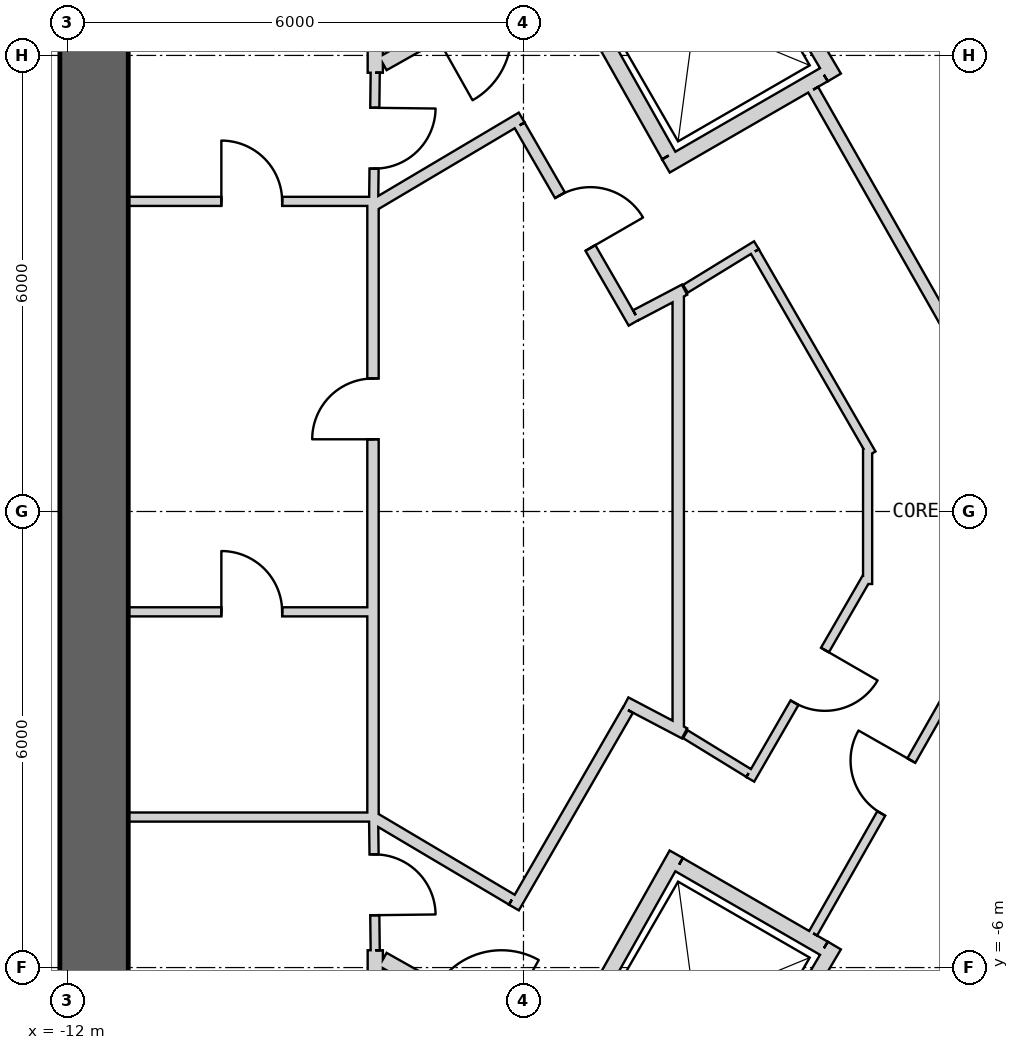
"""IFC4 building model, lengths in metres.
Left out: names, types, materials, properties, quantities, classifications, styles, units other than length and angle.
Written with IfcOpenShell. Run it as: python <this file> out.ifc"""

import sys

from ifc_helpers import new_model, si_unit, direction, frame, frame_2d, origin, place, context, subcontext, project, spatial, rectangle, extrude, element, fill, save


model = new_model("IFC4")
c1 = context("Model", 3, precision=1e-05, world=origin(), true_north=direction((0.0, 1.0)))
c2 = subcontext(c1, "Body", "Model", "MODEL_VIEW")
j1 = project(units=[si_unit("LENGTHUNIT", "METRE"), si_unit("PLANEANGLEUNIT", "RADIAN")], contexts=[c1])
p1 = place(None, origin())
s1 = spatial("IfcSite", under=j1, at=p1, CompositionType="ELEMENT")
p2 = place(p1, origin())
s2 = spatial("IfcBuilding", under=s1, at=p2, CompositionType="ELEMENT")
p3 = place(p2, frame((0.0, 0.0, 435.3)))
s3 = spatial("IfcBuildingStorey", under=s2, at=p3, CompositionType="ELEMENT", Elevation=435.3)
p4 = place(p3, frame((19.475, 2.208, 0.0), z_axis=(0.0, 0.0, 1.0), x_axis=(-0.866028369851, 0.499994862586, 0.0)))
e1 = element("IfcWall", 1, at=p4, inside=s3, PredefinedType="SHEAR", context=c2, shape_type="SweptSolid", body=[
    extrude(rectangle(XDim=31.523, YDim=0.9, at=frame_2d((15.762, 0.0))), origin(), (0.0, 0.0, 1.0), 5.0),
])
p5 = place(p4, frame((3.612, 0.0, 0.0)))
e2 = element("IfcOpeningElement", 2, at=p5, cuts=e1, PredefinedType="OPENING", context=c2, shape_type="SweptSolid", body=[
    extrude(rectangle(XDim=1.2, YDim=2.4, at=frame_2d((0.6, 1.2))), frame((0.0, 0.46, 0.0), z_axis=(0.0, -1.0, 0.0), x_axis=(1.0, 0.0, 0.0)), (0.0, 0.0, 1.0), 0.92),
])
p6 = place(p4, frame((26.712, 0.0, 0.0)))
e3 = element("IfcOpeningElement", 3, at=p6, cuts=e1, PredefinedType="OPENING", context=c2, shape_type="SweptSolid", body=[
    extrude(rectangle(XDim=1.2, YDim=2.4, at=frame_2d((0.6, 1.2))), frame((0.0, 0.46, 0.0), z_axis=(0.0, -1.0, 0.0), x_axis=(1.0, 0.0, 0.0)), (0.0, 0.0, 1.0), 0.92),
])
p7 = place(p3, frame((-11.65, 15.762, 0.0), z_axis=(0.0, 0.0, 1.0), x_axis=(0.0, -1.0, 0.0)))
e4 = element("IfcWall", 4, at=p7, inside=s3, PredefinedType="SHEAR", context=c2, shape_type="SweptSolid", body=[
    extrude(rectangle(XDim=31.523, YDim=0.9, at=frame_2d((15.762, 0.0))), origin(), (0.0, 0.0, 1.0), 5.0),
])
p8 = place(p7, frame((3.612, 0.0, 0.0)))
e5 = element("IfcOpeningElement", 5, at=p8, cuts=e4, PredefinedType="OPENING", context=c2, shape_type="SweptSolid", body=[
    extrude(rectangle(XDim=1.2, YDim=2.4, at=frame_2d((0.6, 1.2))), frame((0.0, 0.46, 0.0), z_axis=(0.0, -1.0, 0.0), x_axis=(1.0, 0.0, 0.0)), (0.0, 0.0, 1.0), 0.92),
])
p9 = place(p7, frame((26.712, 0.0, 0.0)))
e6 = element("IfcOpeningElement", 6, at=p9, cuts=e4, PredefinedType="OPENING", context=c2, shape_type="SweptSolid", body=[
    extrude(rectangle(XDim=1.2, YDim=2.4, at=frame_2d((0.6, 1.2))), frame((0.0, 0.46, 0.0), z_axis=(0.0, -1.0, 0.0), x_axis=(1.0, 0.0, 0.0)), (0.0, 0.0, 1.0), 0.92),
])
p10 = place(p3, frame((-7.825, -17.97, 0.0), z_axis=(0.0, 0.0, 1.0), x_axis=(0.866028369851, 0.499994862586, 0.0)))
e7 = element("IfcWall", 7, at=p10, inside=s3, PredefinedType="SHEAR", context=c2, shape_type="SweptSolid", body=[
    extrude(rectangle(XDim=31.523, YDim=0.9, at=frame_2d((15.762, 0.0))), origin(), (0.0, 0.0, 1.0), 5.0),
])
p11 = place(p10, frame((17.862, 0.0, 0.0)))
e8 = element("IfcOpeningElement", 8, at=p11, cuts=e7, PredefinedType="OPENING", context=c2, shape_type="SweptSolid", body=[
    extrude(rectangle(XDim=1.2, YDim=2.4, at=frame_2d((0.6, 1.2))), frame((0.0, 0.46, 0.0), z_axis=(0.0, -1.0, 0.0), x_axis=(1.0, 0.0, 0.0)), (0.0, 0.0, 1.0), 0.92),
])
p12 = place(p10, frame((20.562, 0.0, 0.0)))
e9 = element("IfcOpeningElement", 9, at=p12, cuts=e7, PredefinedType="OPENING", context=c2, shape_type="SweptSolid", body=[
    extrude(rectangle(XDim=1.2, YDim=2.4, at=frame_2d((0.6, 1.2))), frame((0.0, 0.46, 0.0), z_axis=(0.0, -1.0, 0.0), x_axis=(1.0, 0.0, 0.0)), (0.0, 0.0, 1.0), 0.92),
])
p13 = place(p10, frame((26.712, 0.0, 0.0)))
e10 = element("IfcOpeningElement", 10, at=p13, cuts=e7, PredefinedType="OPENING", context=c2, shape_type="SweptSolid", body=[
    extrude(rectangle(XDim=1.2, YDim=2.4, at=frame_2d((0.6, 1.2))), frame((0.0, 0.46, 0.0), z_axis=(0.0, -1.0, 0.0), x_axis=(1.0, 0.0, 0.0)), (0.0, 0.0, 1.0), 0.92),
])
p14 = place(p10, frame((3.612, 0.0, 0.0)))
e11 = element("IfcOpeningElement", 11, at=p14, cuts=e7, PredefinedType="OPENING", context=c2, shape_type="SweptSolid", body=[
    extrude(rectangle(XDim=1.2, YDim=2.4, at=frame_2d((0.6, 1.2))), frame((0.0, 0.46, 0.0), z_axis=(0.0, -1.0, 0.0), x_axis=(1.0, 0.0, 0.0)), (0.0, 0.0, 1.0), 0.92),
])
p15 = place(p3, frame((-3.538, 8.465, 0.0), z_axis=(0.0, 0.0, 1.0), x_axis=(0.508616218331, -0.860993346345, 0.0)))
e12 = element("IfcWall", 12, at=p15, inside=s3, PredefinedType="PLUMBINGWALL", context=c2, shape_type="SweptSolid", body=[
    extrude(rectangle(XDim=3.2, YDim=0.2, at=frame_2d((1.6, 0.0))), origin(), (0.0, 0.0, 1.0), 4.75),
])
p16 = place(p3, frame((-2.047, 5.746, 0.0), z_axis=(0.0, 0.0, 1.0), x_axis=(-0.866024647952, -0.500001309137, 0.0)))
e13 = element("IfcWall", 13, at=p16, inside=s3, PredefinedType="PLUMBINGWALL", context=c2, shape_type="SweptSolid", body=[
    extrude(rectangle(XDim=2.4, YDim=0.2, at=frame_2d((1.2, 0.0))), origin(), (0.0, 0.0, 1.0), 4.75),
])
p17 = place(p3, frame((-5.562, 7.296, 0.0), z_axis=(0.0, 0.0, 1.0), x_axis=(0.49134651263, -0.870964180966, 0.0)))
e14 = element("IfcWall", 14, at=p17, inside=s3, PredefinedType="PLUMBINGWALL", context=c2, shape_type="SweptSolid", body=[
    extrude(rectangle(XDim=3.0, YDim=0.2, at=frame_2d((1.5, 0.0))), origin(), (0.0, 0.0, 1.0), 4.75),
])
p18 = place(p3, frame((-3.953, -4.646, 0.0), z_axis=(0.0, 0.0, 1.0), x_axis=(0.86605622881, -0.499946605688, 0.0)))
e15 = element("IfcWall", 15, at=p18, inside=s3, PredefinedType="PLUMBINGWALL", context=c2, shape_type="SweptSolid", body=[
    extrude(rectangle(XDim=2.2, YDim=0.2, at=frame_2d((1.1, 0.0))), origin(), (0.0, 0.0, 1.0), 4.75),
])
p19 = place(p3, frame((-1.91, -5.71, 0.0), z_axis=(0.0, 0.0, 1.0), x_axis=(-0.508616218331, -0.860993346345, 0.0)))
e16 = element("IfcWall", 16, at=p19, inside=s3, PredefinedType="PLUMBINGWALL", context=c2, shape_type="SweptSolid", body=[
    extrude(rectangle(XDim=3.2, YDim=0.2, at=frame_2d((1.6, 0.0))), origin(), (0.0, 0.0, 1.0), 4.75),
])
p20 = place(p3, frame((-3.99, -4.509, 0.0), z_axis=(0.0, 0.0, 1.0), x_axis=(-0.491358283181, -0.870957540612, 0.0)))
e17 = element("IfcWall", 17, at=p20, inside=s3, PredefinedType="PLUMBINGWALL", context=c2, shape_type="SweptSolid", body=[
    extrude(rectangle(XDim=3.2, YDim=0.2, at=frame_2d((1.6, 0.0))), origin(), (0.0, 0.0, 1.0), 4.75),
])
p21 = place(p3, frame((-11.2, 4.08, 0.0), z_axis=(0.0, 0.0, 1.0), x_axis=(1.0, 0.0, 0.0)))
e18 = element("IfcWall", 18, at=p21, inside=s3, PredefinedType="PARTITIONING", context=c2, shape_type="SweptSolid", body=[
    extrude(rectangle(XDim=3.25, YDim=0.12, at=frame_2d((1.625, 0.0))), origin(), (0.0, 0.0, 1.0), 4.75),
])
p22 = place(p21, frame((1.225, 0.0, 0.0)))
e19 = element("IfcOpeningElement", 19, at=p22, cuts=e18, PredefinedType="OPENING", context=c2, shape_type="SweptSolid", body=[
    extrude(rectangle(XDim=0.8, YDim=2.1, at=frame_2d((0.4, 1.05))), frame((0.0, 0.07, 0.0), z_axis=(0.0, -1.0, 0.0), x_axis=(1.0, 0.0, 0.0)), (0.0, 0.0, 1.0), 0.14),
])
p23 = place(p3, frame((-7.95, -9.55, 0.0), z_axis=(0.0, 0.0, 1.0), x_axis=(0.0, 1.0, 0.0)))
e20 = element("IfcWall", 20, at=p23, inside=s3, PredefinedType="PARTITIONING", context=c2, shape_type="SweptSolid", body=[
    extrude(rectangle(XDim=3.778, YDim=0.2, at=frame_2d((1.889, 0.0))), origin(), (0.0, 0.0, 1.0), 4.75),
])
p24 = place(p3, frame((-7.95, 5.772, 0.0), z_axis=(0.0, 0.0, 1.0), x_axis=(0.0, 1.0, 0.0)))
e21 = element("IfcWall", 21, at=p24, inside=s3, PredefinedType="PARTITIONING", context=c2, shape_type="SweptSolid", body=[
    extrude(rectangle(XDim=3.578, YDim=0.2, at=frame_2d((1.789, 0.0))), origin(), (0.0, 0.0, 1.0), 4.75),
])
p25 = place(p3, frame((-7.971, 4.05, 0.0), z_axis=(0.0, 0.0, 1.0), x_axis=(0.012047318415, 0.999927428426, 0.0)))
e22 = element("IfcWall", 22, at=p25, inside=s3, PredefinedType="PARTITIONING", context=c2, shape_type="SweptSolid", body=[
    extrude(rectangle(XDim=1.723, YDim=0.12, at=frame_2d((0.861, 0.0))), origin(), (0.0, 0.0, 1.0), 4.75),
])
p26 = place(p25, frame((0.461, 0.0, 0.0)))
e23 = element("IfcOpeningElement", 23, at=p26, cuts=e22, PredefinedType="OPENING", context=c2, shape_type="SweptSolid", body=[
    extrude(rectangle(XDim=0.8, YDim=2.1, at=frame_2d((0.4, 1.05))), frame((0.0, 0.07, 0.0), z_axis=(0.0, -1.0, 0.0), x_axis=(1.0, 0.0, 0.0)), (0.0, 0.0, 1.0), 0.14),
])
p27 = place(p3, frame((-11.2, -1.32, 0.0), z_axis=(0.0, 0.0, 1.0), x_axis=(1.0, 0.0, 0.0)))
e24 = element("IfcWall", 24, at=p27, inside=s3, PredefinedType="PARTITIONING", context=c2, shape_type="SweptSolid", body=[
    extrude(rectangle(XDim=3.25, YDim=0.12, at=frame_2d((1.625, 0.0))), origin(), (0.0, 0.0, 1.0), 4.75),
])
p28 = place(p27, frame((1.225, 0.0, 0.0)))
e25 = element("IfcOpeningElement", 25, at=p28, cuts=e24, PredefinedType="OPENING", context=c2, shape_type="SweptSolid", body=[
    extrude(rectangle(XDim=0.8, YDim=2.1, at=frame_2d((0.4, 1.05))), frame((0.0, 0.07, 0.0), z_axis=(0.0, -1.0, 0.0), x_axis=(1.0, 0.0, 0.0)), (0.0, 0.0, 1.0), 0.14),
])
p29 = place(p3, frame((-7.98, 4.05, 0.0), z_axis=(0.0, 0.0, 1.0), x_axis=(0.0, -1.0, 0.0)))
e26 = element("IfcWall", 26, at=p29, inside=s3, PredefinedType="PLUMBINGWALL", context=c2, shape_type="SweptSolid", body=[
    extrude(rectangle(XDim=8.1, YDim=0.15, at=frame_2d((4.05, 0.0))), origin(), (0.0, 0.0, 1.0), 4.75),
])
p30 = place(p29, frame((2.3, 0.0, 0.0)))
e27 = element("IfcOpeningElement", 27, at=p30, cuts=e26, PredefinedType="OPENING", context=c2, shape_type="SweptSolid", body=[
    extrude(rectangle(XDim=0.8, YDim=2.1, at=frame_2d((0.4, 1.05))), frame((0.0, 0.085, 0.0), z_axis=(0.0, -1.0, 0.0), x_axis=(1.0, 0.0, 0.0)), (0.0, 0.0, 1.0), 0.17),
])
p31 = place(p3, frame((-7.95, -4.02, 0.0), z_axis=(0.0, 0.0, 1.0), x_axis=(-1.0, 0.0, 0.0)))
e28 = element("IfcWall", 28, at=p31, inside=s3, PredefinedType="PARTITIONING", context=c2, shape_type="SweptSolid", body=[
    extrude(rectangle(XDim=3.25, YDim=0.12, at=frame_2d((1.625, 0.0))), origin(), (0.0, 0.0, 1.0), 4.75),
])
p32 = place(p3, frame((-7.951, -5.772, 0.0), z_axis=(0.0, 0.0, 1.0), x_axis=(-0.012047318415, 0.999927428426, 0.0)))
e29 = element("IfcWall", 29, at=p32, inside=s3, PredefinedType="PARTITIONING", context=c2, shape_type="SweptSolid", body=[
    extrude(rectangle(XDim=1.723, YDim=0.12, at=frame_2d((0.861, 0.0))), origin(), (0.0, 0.0, 1.0), 4.75),
])
p33 = place(p32, frame((0.461, 0.0, 0.0)))
e30 = element("IfcOpeningElement", 30, at=p33, cuts=e29, PredefinedType="OPENING", context=c2, shape_type="SweptSolid", body=[
    extrude(rectangle(XDim=0.8, YDim=2.1, at=frame_2d((0.4, 1.05))), frame((0.0, 0.07, 0.0), z_axis=(0.0, -1.0, 0.0), x_axis=(1.0, 0.0, 0.0)), (0.0, 0.0, 1.0), 0.14),
])
p34 = place(p3, frame((-5.6, 7.16, 0.0), z_axis=(0.0, 0.0, 1.0), x_axis=(-0.871350695252, -0.490660744185, 0.0)))
e31 = element("IfcWall", 31, at=p34, inside=s3, PredefinedType="PARTITIONING", context=c2, shape_type="SweptSolid", body=[
    extrude(rectangle(XDim=2.582, YDim=0.2, at=frame_2d((1.291, 0.0))), origin(), (0.0, 0.0, 1.0), 4.75),
])
p35 = place(p34, frame((0.791, 0.0, 0.0)))
e32 = element("IfcOpeningElement", 32, at=p35, cuts=e31, PredefinedType="OPENING", context=c2, shape_type="SweptSolid", body=[
    extrude(rectangle(XDim=1.0, YDim=2.1, at=frame_2d((0.5, 1.05))), frame((0.0, 0.11, 0.0), z_axis=(0.0, -1.0, 0.0), x_axis=(1.0, 0.0, 0.0)), (0.0, 0.0, 1.0), 0.22),
])
p36 = place(p3, frame((-7.85, -5.893, 0.0), z_axis=(0.0, 0.0, 1.0), x_axis=(0.871350695252, -0.490660744185, 0.0)))
e33 = element("IfcWall", 33, at=p36, inside=s3, PredefinedType="PARTITIONING", context=c2, shape_type="SweptSolid", body=[
    extrude(rectangle(XDim=2.582, YDim=0.2, at=frame_2d((1.291, 0.0))), origin(), (0.0, 0.0, 1.0), 4.75),
])
p37 = place(p36, frame((0.791, 0.0, 0.0)))
e34 = element("IfcOpeningElement", 34, at=p37, cuts=e33, PredefinedType="OPENING", context=c2, shape_type="SweptSolid", body=[
    extrude(rectangle(XDim=1.0, YDim=2.1, at=frame_2d((0.5, 1.05))), frame((0.0, 0.11, 0.0), z_axis=(0.0, -1.0, 0.0), x_axis=(1.0, 0.0, 0.0)), (0.0, 0.0, 1.0), 0.22),
])
p38 = place(p3, frame((-2.189, 5.549, 0.0), z_axis=(0.0, 0.0, 1.0), x_axis=(0.494335077001, -0.869271437266, 0.0)))
e35 = element("IfcWall", 35, at=p38, inside=s3, PredefinedType="PLUMBINGWALL", context=c2, shape_type="SweptSolid", body=[
    extrude(rectangle(XDim=4.404, YDim=0.15, at=frame_2d((2.202, 0.0))), origin(), (0.0, 0.0, 1.0), 4.75),
])
p39 = place(p3, frame((0.051, -1.611, 0.0), z_axis=(0.0, 0.0, 1.0), x_axis=(-0.49434454467, -0.869266053148, 0.0)))
e36 = element("IfcWall", 36, at=p39, inside=s3, PredefinedType="PARTITIONING", context=c2, shape_type="SweptSolid", body=[
    extrude(rectangle(XDim=4.53, YDim=0.12, at=frame_2d((2.265, 0.0))), origin(), (0.0, 0.0, 1.0), 4.75),
])
p40 = place(p39, frame((1.916, 0.0, 0.0)))
e37 = element("IfcOpeningElement", 37, at=p40, cuts=e36, PredefinedType="OPENING", context=c2, shape_type="SweptSolid", body=[
    extrude(rectangle(XDim=0.8, YDim=2.1, at=frame_2d((0.4, 1.05))), frame((0.0, 0.07, 0.0), z_axis=(0.0, -1.0, 0.0), x_axis=(1.0, 0.0, 0.0)), (0.0, 0.0, 1.0), 0.14),
])
p41 = place(p3, frame((-3.964, -2.908, 0.0), z_axis=(0.0, 0.0, 1.0), x_axis=(0.0, 1.0, 0.0)))
e38 = element("IfcWall", 38, at=p41, inside=s3, PredefinedType="PLUMBINGWALL", context=c2, shape_type="SweptSolid", body=[
    extrude(rectangle(XDim=5.815, YDim=0.15, at=frame_2d((2.908, 0.0))), origin(), (0.0, 0.0, 1.0), 4.75),
])
p42 = place(p3, frame((-4.655, -2.512, 0.0), z_axis=(0.0, 0.0, 1.0), x_axis=(0.885372046241, -0.464883146323, 0.0)))
e39 = element("IfcWall", 39, at=p42, inside=s3, PredefinedType="PLUMBINGWALL", context=c2, shape_type="SweptSolid", body=[
    extrude(rectangle(XDim=0.875, YDim=0.15, at=frame_2d((0.437, 0.0))), origin(), (0.0, 0.0, 1.0), 4.75),
])
p43 = place(p3, frame((-6.126, -5.21, 0.0), z_axis=(0.0, 0.0, 1.0), x_axis=(0.499990139034, 0.866031096941, 0.0)))
e40 = element("IfcWall", 40, at=p43, inside=s3, PredefinedType="PLUMBINGWALL", context=c2, shape_type="SweptSolid", body=[
    extrude(rectangle(XDim=3.0, YDim=0.15, at=frame_2d((1.5, 0.0))), origin(), (0.0, 0.0, 1.0), 4.75),
])
p44 = place(p3, frame((-7.95, -4.041, 0.0), z_axis=(0.0, 0.0, 1.0), x_axis=(0.860090281069, -0.510141851263, 0.0)))
e41 = element("IfcWall", 41, at=p44, inside=s3, PredefinedType="PLUMBINGWALL", context=c2, shape_type="SweptSolid", body=[
    extrude(rectangle(XDim=2.089, YDim=0.15, at=frame_2d((1.045, 0.0))), origin(), (0.0, 0.0, 1.0), 4.75),
])
p45 = place(p3, frame((-6.024, 5.183, 0.0), z_axis=(0.0, 0.0, 1.0), x_axis=(-0.860126804455, -0.510080268447, 0.0)))
e42 = element("IfcWall", 42, at=p45, inside=s3, PredefinedType="PLUMBINGWALL", context=c2, shape_type="SweptSolid", body=[
    extrude(rectangle(XDim=2.24, YDim=0.15, at=frame_2d((1.12, 0.0))), origin(), (0.0, 0.0, 1.0), 4.75),
])
p46 = place(p3, frame((-4.551, 2.482, 0.0), z_axis=(0.0, 0.0, 1.0), x_axis=(-0.499990139034, 0.866031096941, 0.0)))
e43 = element("IfcWall", 43, at=p46, inside=s3, PredefinedType="PLUMBINGWALL", context=c2, shape_type="SweptSolid", body=[
    extrude(rectangle(XDim=3.0, YDim=0.15, at=frame_2d((1.5, 0.0))), origin(), (0.0, 0.0, 1.0), 4.75),
])
p47 = place(p46, frame((1.137, 0.0, 0.0)))
e44 = element("IfcOpeningElement", 44, at=p47, cuts=e43, PredefinedType="OPENING", context=c2, shape_type="SweptSolid", body=[
    extrude(rectangle(XDim=0.8, YDim=2.1, at=frame_2d((0.4, 1.05))), frame((0.0, 0.085, 0.0), z_axis=(0.0, -1.0, 0.0), x_axis=(1.0, 0.0, 0.0)), (0.0, 0.0, 1.0), 0.17),
])
p48 = place(p3, frame((-3.881, 2.919, 0.0), z_axis=(0.0, 0.0, 1.0), x_axis=(-0.885422176933, -0.464787659684, 0.0)))
e45 = element("IfcWall", 45, at=p48, inside=s3, PredefinedType="PLUMBINGWALL", context=c2, shape_type="SweptSolid", body=[
    extrude(rectangle(XDim=0.724, YDim=0.15, at=frame_2d((0.362, 0.0))), origin(), (0.0, 0.0, 1.0), 4.75),
])
p49 = place(p3, frame((-2.935, 3.503, 0.0), z_axis=(0.0, 0.0, 1.0), x_axis=(-0.852482838041, -0.522755211209, 0.0)))
e46 = element("IfcWall", 46, at=p49, inside=s3, PredefinedType="PARTITIONING", context=c2, shape_type="SweptSolid", body=[
    extrude(rectangle(XDim=1.097, YDim=0.12, at=frame_2d((0.548, 0.0))), origin(), (0.0, 0.0, 1.0), 4.75),
])
p50 = place(p3, frame((-1.42, 0.76, 0.0), z_axis=(0.0, 0.0, 1.0), x_axis=(-0.500011413361, 0.866018814177, 0.0)))
e47 = element("IfcWall", 47, at=p50, inside=s3, PredefinedType="PARTITIONING", context=c2, shape_type="SweptSolid", body=[
    extrude(rectangle(XDim=3.072, YDim=0.12, at=frame_2d((1.536, 0.0))), origin(), (0.0, 0.0, 1.0), 4.75),
])
p51 = place(p3, frame((-1.472, -0.954, 0.0), z_axis=(0.0, 0.0, 1.0), x_axis=(0.0, 1.0, 0.0)))
e48 = element("IfcWall", 48, at=p51, inside=s3, PredefinedType="PARTITIONING", context=c2, shape_type="SweptSolid", body=[
    extrude(rectangle(XDim=1.785, YDim=0.12, at=frame_2d((0.893, 0.0))), origin(), (0.0, 0.0, 1.0), 4.75),
])
p52 = place(p3, frame((-3.016, -3.524, 0.0), z_axis=(0.0, 0.0, 1.0), x_axis=(0.499988681553, 0.866031938394, 0.0)))
e49 = element("IfcWall", 49, at=p52, inside=s3, PredefinedType="PARTITIONING", context=c2, shape_type="SweptSolid", body=[
    extrude(rectangle(XDim=3.069, YDim=0.12, at=frame_2d((1.535, 0.0))), origin(), (0.0, 0.0, 1.0), 4.75),
])
p53 = place(p52, frame((1.165, 0.0, 0.0)))
e50 = element("IfcOpeningElement", 50, at=p53, cuts=e49, PredefinedType="OPENING", context=c2, shape_type="SweptSolid", body=[
    extrude(rectangle(XDim=0.8, YDim=2.1, at=frame_2d((0.4, 1.05))), frame((0.0, 0.07, 0.0), z_axis=(0.0, -1.0, 0.0), x_axis=(1.0, 0.0, 0.0)), (0.0, 0.0, 1.0), 0.14),
])
p54 = place(p3, frame((-3.87, -2.93, 0.0), z_axis=(0.0, 0.0, 1.0), x_axis=(0.852489850103, -0.522743776119, 0.0)))
e51 = element("IfcWall", 51, at=p54, inside=s3, PredefinedType="PARTITIONING", context=c2, shape_type="SweptSolid", body=[
    extrude(rectangle(XDim=0.977, YDim=0.12, at=frame_2d((0.488, 0.0))), origin(), (0.0, 0.0, 1.0), 4.75),
])
p55 = place(p3, frame((20.834, 3.675, 0.0), z_axis=(0.0, 0.0, 1.0), x_axis=(-0.866028536494, 0.499994573949, 0.0)))
e52 = element("IfcWall", 52, at=p55, inside=s3, PredefinedType="PARTITIONING", context=c2, shape_type="SweptSolid", body=[
    extrude(rectangle(XDim=32.411, YDim=0.2, at=frame_2d((16.206, 0.0))), origin(), (0.0, 0.0, 1.0), 4.75),
])
p56 = place(p55, frame((7.7, 0.0, 0.0)))
e53 = element("IfcOpeningElement", 53, at=p56, cuts=e52, PredefinedType="OPENING", context=c2, shape_type="SweptSolid", body=[
    extrude(rectangle(XDim=1.0, YDim=2.1, at=frame_2d((0.5, 1.05))), frame((0.0, 0.11, 0.0), z_axis=(0.0, -1.0, 0.0), x_axis=(1.0, 0.0, 0.0)), (0.0, 0.0, 1.0), 0.22),
])
p57 = place(p55, frame((18.006, 0.0, 0.0)))
e54 = element("IfcOpeningElement", 54, at=p57, cuts=e52, PredefinedType="OPENING", context=c2, shape_type="SweptSolid", body=[
    extrude(rectangle(XDim=1.0, YDim=2.1, at=frame_2d((0.5, 1.05))), frame((0.0, 0.11, 0.0), z_axis=(0.0, -1.0, 0.0), x_axis=(1.0, 0.0, 0.0)), (0.0, 0.0, 1.0), 0.22),
])
p58 = place(p40, origin())
e55 = element("IfcDoor", 55, at=p58, inside=s3, OperationType="SINGLE_SWING_LEFT", PredefinedType="USERDEFINED", context=c2, shape_type="SweptSolid", body=[
    extrude(rectangle(XDim=0.8, YDim=2.1, at=frame_2d((0.4, 1.05))), frame((0.0, 0.025, 0.0), z_axis=(0.0, -1.0, 0.0), x_axis=(1.0, 0.0, 0.0)), (0.0, 0.0, 1.0), 0.05),
])
fill(e37, e55)
p59 = place(p47, origin())
e56 = element("IfcDoor", 56, at=p59, inside=s3, OperationType="SINGLE_SWING_LEFT", PredefinedType="USERDEFINED", context=c2, shape_type="SweptSolid", body=[
    extrude(rectangle(XDim=0.8, YDim=2.1, at=frame_2d((0.4, 1.05))), frame((0.0, 0.025, 0.0), z_axis=(0.0, -1.0, 0.0), x_axis=(1.0, 0.0, 0.0)), (0.0, 0.0, 1.0), 0.05),
])
fill(e44, e56)
p60 = place(p53, origin())
e57 = element("IfcDoor", 57, at=p60, inside=s3, OperationType="SINGLE_SWING_RIGHT", PredefinedType="USERDEFINED", context=c2, shape_type="SweptSolid", body=[
    extrude(rectangle(XDim=0.8, YDim=2.1, at=frame_2d((0.4, 1.05))), frame((0.0, 0.025, 0.0), z_axis=(0.0, -1.0, 0.0), x_axis=(1.0, 0.0, 0.0)), (0.0, 0.0, 1.0), 0.05),
])
fill(e50, e57)
p61 = place(p26, origin())
e58 = element("IfcDoor", 58, at=p61, inside=s3, OperationType="SINGLE_SWING_RIGHT", PredefinedType="USERDEFINED", context=c2, shape_type="SweptSolid", body=[
    extrude(rectangle(XDim=0.8, YDim=2.1, at=frame_2d((0.4, 1.05))), frame((0.0, 0.025, 0.0), z_axis=(0.0, -1.0, 0.0), x_axis=(1.0, 0.0, 0.0)), (0.0, 0.0, 1.0), 0.05),
])
fill(e23, e58)
p62 = place(p28, origin())
e59 = element("IfcDoor", 59, at=p62, inside=s3, OperationType="SINGLE_SWING_LEFT", PredefinedType="USERDEFINED", context=c2, shape_type="SweptSolid", body=[
    extrude(rectangle(XDim=0.8, YDim=2.1, at=frame_2d((0.4, 1.05))), frame((0.0, 0.025, 0.0), z_axis=(0.0, -1.0, 0.0), x_axis=(1.0, 0.0, 0.0)), (0.0, 0.0, 1.0), 0.05),
])
fill(e25, e59)
p63 = place(p33, origin())
e60 = element("IfcDoor", 60, at=p63, inside=s3, OperationType="SINGLE_SWING_LEFT", PredefinedType="USERDEFINED", context=c2, shape_type="SweptSolid", body=[
    extrude(rectangle(XDim=0.8, YDim=2.1, at=frame_2d((0.4, 1.05))), frame((0.0, 0.025, 0.0), z_axis=(0.0, -1.0, 0.0), x_axis=(1.0, 0.0, 0.0)), (0.0, 0.0, 1.0), 0.05),
])
fill(e30, e60)
p64 = place(p30, origin())
e61 = element("IfcDoor", 61, at=p64, inside=s3, OperationType="SINGLE_SWING_RIGHT", PredefinedType="USERDEFINED", context=c2, shape_type="SweptSolid", body=[
    extrude(rectangle(XDim=0.8, YDim=2.1, at=frame_2d((0.4, 1.05))), frame((0.0, 0.025, 0.0), z_axis=(0.0, -1.0, 0.0), x_axis=(1.0, 0.0, 0.0)), (0.0, 0.0, 1.0), 0.05),
])
fill(e27, e61)
p65 = place(p22, origin())
e62 = element("IfcDoor", 62, at=p65, inside=s3, OperationType="SINGLE_SWING_LEFT", PredefinedType="USERDEFINED", context=c2, shape_type="SweptSolid", body=[
    extrude(rectangle(XDim=0.8, YDim=2.1, at=frame_2d((0.4, 1.05))), frame((0.0, 0.025, 0.0), z_axis=(0.0, -1.0, 0.0), x_axis=(1.0, 0.0, 0.0)), (0.0, 0.0, 1.0), 0.05),
])
fill(e19, e62)
save(model, sys.argv[1])
